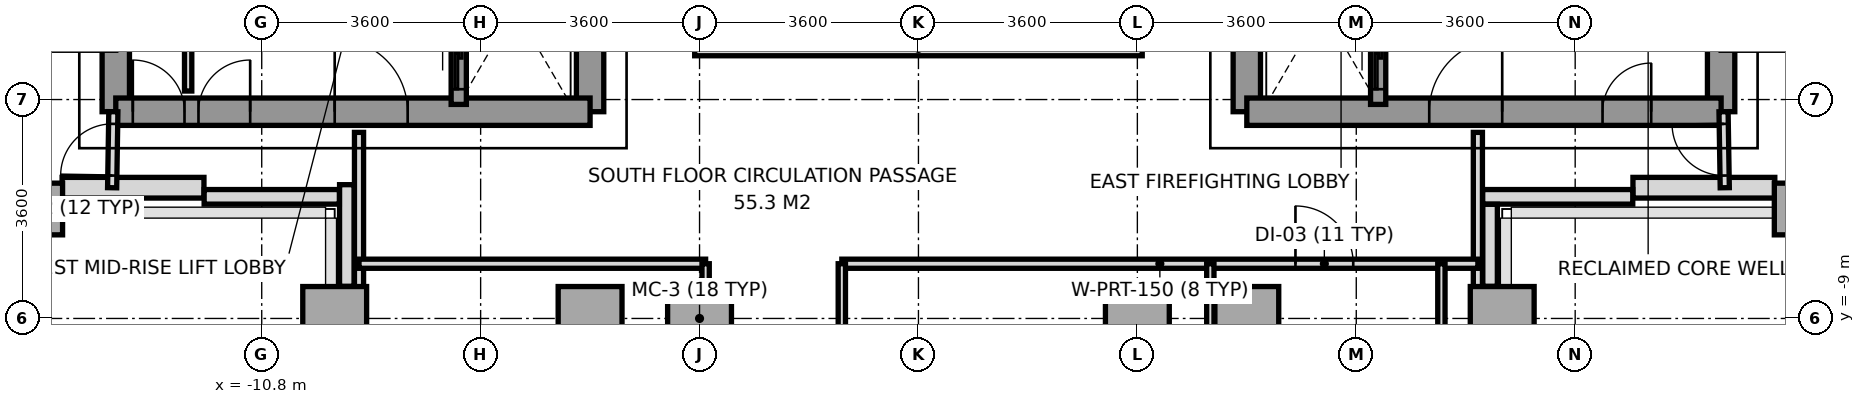
"""IFC4 building model, lengths in metres.
Left out: names, types, materials, properties, quantities, classifications, styles, units other than length and angle.
Written with IfcOpenShell. Run it as: python <this file> out.ifc"""

import sys

from ifc_helpers import new_model, si_unit, direction, frame, frame_2d, origin, origin_2d, place, context, subcontext, project, spatial, rectangle, extrude, source, transform, mapped, element, fill, save


model = new_model("IFC4")
c1 = context("Model", 3, precision=1e-05, world=origin(), true_north=direction((0.0, 1.0)))
c2 = subcontext(c1, "Body", "Model", "MODEL_VIEW")
j1 = project(units=[si_unit("LENGTHUNIT", "METRE"), si_unit("PLANEANGLEUNIT", "RADIAN")], contexts=[c1])
p1 = place(None, origin())
s1 = spatial("IfcSite", under=j1, at=p1, CompositionType="ELEMENT")
p2 = place(p1, origin())
s2 = spatial("IfcBuilding", under=s1, at=p2, CompositionType="ELEMENT")
p3 = place(p2, frame((0.0, 0.0, 127.8)))
s3 = spatial("IfcBuildingStorey", under=s2, at=p3, CompositionType="ELEMENT", Elevation=127.8)
m1 = source(origin(), c2, "Body", "SweptSolid", [
    extrude(rectangle(XDim=0.65, YDim=0.85, at=origin_2d()), origin(), (0.0, 0.0, 1.0), 3.2),
])
p4 = place(p3, frame((-14.4, -7.2, 0.0), z_axis=(0.0, 0.0, 1.0), x_axis=(1.0, 0.0, 0.0)))
e1 = element("IfcColumn", 1, at=p4, inside=s3, PredefinedType="COLUMN", context=c2, shape_type="MappedRepresentation", body=[
    mapped(m1, transform((0.0, 0.0, 0.0), x_axis=(1.0, 0.0, 0.0), y_axis=(0.0, 1.0, 0.0), z_axis=(0.0, 0.0, 1.0), scale=1.0)),
])
m2 = source(origin(), c2, "Body", "SweptSolid", [
    extrude(rectangle(XDim=1.05, YDim=1.05, at=origin_2d()), origin(), (0.0, 0.0, 1.0), 3.2),
])
for number, where, z_axis, x_axis in (
    (2, (-9.6, -9.0, 0.0), (0.0, 0.0, 1.0), (1.0, 0.0, 0.0)),
    (3, (-5.4, -9.0, 0.0), (0.0, 0.0, 1.0), (1.0, 0.0, 0.0)),
    (4, (-3.6, -9.0, 0.0), (0.0, 0.0, 1.0), (1.0, 0.0, 0.0)),
    (5, (3.6, -9.0, 0.0), (0.0, 0.0, 1.0), (1.0, 0.0, 0.0)),
    (6, (5.4, -9.0, 0.0), (0.0, 0.0, 1.0), (1.0, 0.0, 0.0)),
    (7, (9.6, -9.0, 0.0), (0.0, 0.0, 1.0), (1.0, 0.0, 0.0)),
):
    element("IfcColumn", number, at=place(p3, frame(where, z_axis=z_axis, x_axis=x_axis)), inside=s3, PredefinedType="COLUMN", context=c2, shape_type="MappedRepresentation", body=[
        mapped(m2, transform((0.0, 0.0, 0.0), x_axis=(1.0, 0.0, 0.0), y_axis=(0.0, 1.0, 0.0), z_axis=(0.0, 0.0, 1.0), scale=1.0)),
    ])
p5 = place(p3, frame((14.4, -7.2, 0.0), z_axis=(0.0, 0.0, 1.0), x_axis=(1.0, 0.0, 0.0)))
e8 = element("IfcColumn", 8, at=p5, inside=s3, PredefinedType="COLUMN", context=c2, shape_type="MappedRepresentation", body=[
    mapped(m1, transform((0.0, 0.0, 0.0), x_axis=(1.0, 0.0, 0.0), y_axis=(0.0, 1.0, 0.0), z_axis=(0.0, 0.0, 1.0), scale=1.0)),
])
for number, where, z_axis, x_axis in (
    (9, (-14.083, -6.85, 0.0), (0.0, 0.0, 1.0), (1.0, 0.0, 0.0)),
    (10, (11.75, -6.85, 0.0), (0.0, 0.0, 1.0), (1.0, 0.0, 0.0)),
):
    element("IfcWall", number, at=place(p3, frame(where, z_axis=z_axis, x_axis=x_axis)), inside=s3, PredefinedType="SOLIDWALL", context=c2, shape_type="SweptSolid", body=[
        extrude(rectangle(XDim=2.333, YDim=0.34, at=frame_2d((1.167, 0.0))), origin(), (0.0, 0.0, 1.0), 3.2),
    ])
p6 = place(p3, frame((11.747, -7.0, 0.0), z_axis=(0.0, 0.0, 1.0), x_axis=(-1.0, 0.0, 0.0)))
e11 = element("IfcWall", 11, at=p6, inside=s3, PredefinedType="PARAPET", context=c2, shape_type="SweptSolid", body=[
    extrude(rectangle(XDim=2.469, YDim=0.24, at=frame_2d((1.234, 0.0))), origin(), (0.0, 0.0, 1.0), 1.15),
])
p7 = place(p3, frame((9.4, -7.123, 0.0), z_axis=(0.0, 0.0, 1.0), x_axis=(0.0, -1.0, 0.0)))
e12 = element("IfcWall", 12, at=p7, inside=s3, PredefinedType="PARAPET", context=c2, shape_type="SweptSolid", body=[
    extrude(rectangle(XDim=1.349, YDim=0.24, at=frame_2d((0.674, 0.0))), origin(), (0.0, 0.0, 1.0), 1.15),
])
p8 = place(p3, frame((-9.4, -8.472, 0.0), z_axis=(0.0, 0.0, 1.0), x_axis=(0.0, 1.0, 0.0)))
e13 = element("IfcWall", 13, at=p8, inside=s3, PredefinedType="PARAPET", context=c2, shape_type="SweptSolid", body=[
    extrude(rectangle(XDim=1.672, YDim=0.24, at=frame_2d((0.836, 0.0))), origin(), (0.0, 0.0, 1.0), 1.15),
])
p9 = place(p3, frame((-9.523, -7.0, 0.0), z_axis=(0.0, 0.0, 1.0), x_axis=(-1.0, 0.0, 0.0)))
e14 = element("IfcWall", 14, at=p9, inside=s3, PredefinedType="PARAPET", context=c2, shape_type="SweptSolid", body=[
    extrude(rectangle(XDim=2.224, YDim=0.24, at=frame_2d((1.112, 0.0))), origin(), (0.0, 0.0, 1.0), 1.15),
])
p10 = place(p3, frame((-13.2, -5.6, 0.0), z_axis=(0.0, 0.0, 1.0), x_axis=(0.0, 1.0, 0.0)))
e15 = element("IfcWall", 15, at=p10, inside=s3, PredefinedType="SHEAR", context=c2, shape_type="SweptSolid", body=[
    extrude(rectangle(XDim=11.2, YDim=0.45, at=frame_2d((5.6, 0.0))), origin(), (0.0, 0.0, 1.0), 3.2),
])
p11 = place(p3, frame((-5.4, -5.6, 0.0), z_axis=(0.0, 0.0, 1.0), x_axis=(0.0, 1.0, 0.0)))
e16 = element("IfcWall", 16, at=p11, inside=s3, PredefinedType="SHEAR", context=c2, shape_type="SweptSolid", body=[
    extrude(rectangle(XDim=12.5, YDim=0.45, at=frame_2d((6.25, 0.0))), origin(), (0.0, 0.0, 1.0), 3.2),
])
p12 = place(p11, frame((4.55, 0.0, 0.0)))
e17 = element("IfcOpeningElement", 17, at=p12, cuts=e16, PredefinedType="OPENING", context=c2, shape_type="SweptSolid", body=[
    extrude(rectangle(XDim=1.2, YDim=2.2, at=frame_2d((0.6, 1.1))), frame((0.0, 0.235, 0.0), z_axis=(0.0, -1.0, 0.0), x_axis=(1.0, 0.0, 0.0)), (0.0, 0.0, 1.0), 0.47),
])
p13 = place(p11, frame((6.86, 0.0, 0.0)))
e18 = element("IfcOpeningElement", 18, at=p13, cuts=e16, PredefinedType="OPENING", context=c2, shape_type="SweptSolid", body=[
    extrude(rectangle(XDim=0.8, YDim=2.1, at=frame_2d((0.4, 1.05))), frame((0.0, 0.235, 0.0), z_axis=(0.0, -1.0, 0.0), x_axis=(1.0, 0.0, 0.0)), (0.0, 0.0, 1.0), 0.47),
])
p14 = place(p3, frame((-13.2, -5.6, 0.0), z_axis=(0.0, 0.0, 1.0), x_axis=(1.0, 0.0, 0.0)))
e19 = element("IfcWall", 19, at=p14, inside=s3, PredefinedType="SHEAR", context=c2, shape_type="SweptSolid", body=[
    extrude(rectangle(XDim=7.8, YDim=0.45, at=frame_2d((3.9, 0.0))), origin(), (0.0, 0.0, 1.0), 3.2),
])
p15 = place(p14, frame((3.6, 0.0, 0.0)))
e20 = element("IfcOpeningElement", 20, at=p15, cuts=e19, PredefinedType="OPENING", context=c2, shape_type="SweptSolid", body=[
    extrude(rectangle(XDim=1.2, YDim=2.2, at=frame_2d((0.6, 1.1))), frame((0.0, 0.235, 0.0), z_axis=(0.0, -1.0, 0.0), x_axis=(1.0, 0.0, 0.0)), (0.0, 0.0, 1.0), 0.47),
])
p16 = place(p14, frame((0.28, 0.0, 0.0)))
e21 = element("IfcOpeningElement", 21, at=p16, cuts=e19, PredefinedType="OPENING", context=c2, shape_type="SweptSolid", body=[
    extrude(rectangle(XDim=0.85, YDim=2.1, at=frame_2d((0.425, 1.05))), frame((0.0, 0.235, 0.0), z_axis=(0.0, -1.0, 0.0), x_axis=(1.0, 0.0, 0.0)), (0.0, 0.0, 1.0), 0.47),
])
p17 = place(p14, frame((1.36, 0.0, 0.0)))
e22 = element("IfcOpeningElement", 22, at=p17, cuts=e19, PredefinedType="OPENING", context=c2, shape_type="SweptSolid", body=[
    extrude(rectangle(XDim=0.85, YDim=2.1, at=frame_2d((0.425, 1.05))), frame((0.0, 0.235, 0.0), z_axis=(0.0, -1.0, 0.0), x_axis=(1.0, 0.0, 0.0)), (0.0, 0.0, 1.0), 0.47),
])
p18 = place(p3, frame((13.2, -5.6, 0.0), z_axis=(0.0, 0.0, 1.0), x_axis=(0.0, 1.0, 0.0)))
e23 = element("IfcWall", 23, at=p18, inside=s3, PredefinedType="SHEAR", context=c2, shape_type="SweptSolid", body=[
    extrude(rectangle(XDim=11.2, YDim=0.45, at=frame_2d((5.6, 0.0))), origin(), (0.0, 0.0, 1.0), 3.2),
])
p19 = place(p3, frame((5.4, -5.6, 0.0), z_axis=(0.0, 0.0, 1.0), x_axis=(0.0, 1.0, 0.0)))
e24 = element("IfcWall", 24, at=p19, inside=s3, PredefinedType="SHEAR", context=c2, shape_type="SweptSolid", body=[
    extrude(rectangle(XDim=12.5, YDim=0.45, at=frame_2d((6.25, 0.0))), origin(), (0.0, 0.0, 1.0), 3.2),
])
p20 = place(p19, frame((4.55, 0.0, 0.0)))
e25 = element("IfcOpeningElement", 25, at=p20, cuts=e24, PredefinedType="OPENING", context=c2, shape_type="SweptSolid", body=[
    extrude(rectangle(XDim=1.2, YDim=2.2, at=frame_2d((0.6, 1.1))), frame((0.0, 0.235, 0.0), z_axis=(0.0, -1.0, 0.0), x_axis=(1.0, 0.0, 0.0)), (0.0, 0.0, 1.0), 0.47),
])
p21 = place(p19, frame((6.86, 0.0, 0.0)))
e26 = element("IfcOpeningElement", 26, at=p21, cuts=e24, PredefinedType="OPENING", context=c2, shape_type="SweptSolid", body=[
    extrude(rectangle(XDim=0.8, YDim=2.1, at=frame_2d((0.4, 1.05))), frame((0.0, 0.235, 0.0), z_axis=(0.0, -1.0, 0.0), x_axis=(1.0, 0.0, 0.0)), (0.0, 0.0, 1.0), 0.47),
])
p22 = place(p19, frame((7.88, 0.0, 0.0)))
e27 = element("IfcOpeningElement", 27, at=p22, cuts=e24, PredefinedType="OPENING", context=c2, shape_type="SweptSolid", body=[
    extrude(rectangle(XDim=0.8, YDim=2.1, at=frame_2d((0.4, 1.05))), frame((0.0, 0.235, 0.0), z_axis=(0.0, -1.0, 0.0), x_axis=(1.0, 0.0, 0.0)), (0.0, 0.0, 1.0), 0.47),
])
p23 = place(p3, frame((5.4, -5.6, 0.0), z_axis=(0.0, 0.0, 1.0), x_axis=(1.0, 0.0, 0.0)))
e28 = element("IfcWall", 28, at=p23, inside=s3, PredefinedType="SHEAR", context=c2, shape_type="SweptSolid", body=[
    extrude(rectangle(XDim=7.8, YDim=0.45, at=frame_2d((3.9, 0.0))), origin(), (0.0, 0.0, 1.0), 3.2),
])
p24 = place(p23, frame((3.0, 0.0, 0.0)))
e29 = element("IfcOpeningElement", 29, at=p24, cuts=e28, PredefinedType="OPENING", context=c2, shape_type="SweptSolid", body=[
    extrude(rectangle(XDim=1.2, YDim=2.2, at=frame_2d((0.6, 1.1))), frame((0.0, 0.235, 0.0), z_axis=(0.0, -1.0, 0.0), x_axis=(1.0, 0.0, 0.0)), (0.0, 0.0, 1.0), 0.47),
])
p25 = place(p23, frame((5.85, 0.0, 0.0)))
e30 = element("IfcOpeningElement", 30, at=p25, cuts=e28, PredefinedType="OPENING", context=c2, shape_type="SweptSolid", body=[
    extrude(rectangle(XDim=0.8, YDim=2.1, at=frame_2d((0.4, 1.05))), frame((0.0, 0.235, 0.0), z_axis=(0.0, -1.0, 0.0), x_axis=(1.0, 0.0, 0.0)), (0.0, 0.0, 1.0), 0.47),
])
p26 = place(p3, frame((-7.56, -5.48, 0.0), z_axis=(0.0, 0.0, 1.0), x_axis=(0.0, 1.0, 0.0)))
e31 = element("IfcWall", 31, at=p26, inside=s3, PredefinedType="SOLIDWALL", context=c2, shape_type="SweptSolid", body=[
    extrude(rectangle(XDim=1.6, YDim=0.25, at=frame_2d((0.8, 0.0))), origin(), (0.0, 0.0, 1.0), 3.2),
])
p27 = place(p26, frame((0.25, 0.0, 0.0)))
e32 = element("IfcOpeningElement", 32, at=p27, cuts=e31, PredefinedType="OPENING", context=c2, shape_type="SweptSolid", body=[
    extrude(rectangle(XDim=1.1, YDim=2.2, at=frame_2d((0.55, 1.1))), frame((0.0, 0.135, 0.0), z_axis=(0.0, -1.0, 0.0), x_axis=(1.0, 0.0, 0.0)), (0.0, 0.0, 1.0), 0.27),
])
p28 = place(p3, frame((7.56, -5.48, 0.0), z_axis=(0.0, 0.0, 1.0), x_axis=(0.0, 1.0, 0.0)))
e33 = element("IfcWall", 33, at=p28, inside=s3, PredefinedType="SOLIDWALL", context=c2, shape_type="SweptSolid", body=[
    extrude(rectangle(XDim=1.6, YDim=0.25, at=frame_2d((0.8, 0.0))), origin(), (0.0, 0.0, 1.0), 3.2),
])
p29 = place(p28, frame((0.25, 0.0, 0.0)))
e34 = element("IfcOpeningElement", 34, at=p29, cuts=e33, PredefinedType="OPENING", context=c2, shape_type="SweptSolid", body=[
    extrude(rectangle(XDim=1.1, YDim=2.2, at=frame_2d((0.55, 1.1))), frame((0.0, 0.135, 0.0), z_axis=(0.0, -1.0, 0.0), x_axis=(1.0, 0.0, 0.0)), (0.0, 0.0, 1.0), 0.27),
])
p30 = place(p3, frame((-12.01, -5.26, 0.0), z_axis=(0.0, 0.0, 1.0), x_axis=(0.0, 1.0, 0.0)))
e35 = element("IfcWall", 35, at=p30, inside=s3, PredefinedType="PARTITIONING", context=c2, shape_type="SweptSolid", body=[
    extrude(rectangle(XDim=2.94, YDim=0.12, at=frame_2d((1.47, 0.0))), origin(), (0.0, 0.0, 1.0), 3.2),
])
for number, where, z_axis, x_axis in (
    (36, (-9.2, -15.68, 0.0), (0.0, 0.0, 1.0), (0.0, 1.0, 0.0)),
    (37, (9.2, -15.68, 0.0), (0.0, 0.0, 1.0), (0.0, 1.0, 0.0)),
):
    element("IfcWall", number, at=place(p3, frame(where, z_axis=z_axis, x_axis=x_axis)), inside=s3, PredefinedType="PARTITIONING", context=c2, shape_type="SweptSolid", body=[
        extrude(rectangle(XDim=9.74, YDim=0.15, at=frame_2d((4.87, 0.0))), origin(), (0.0, 0.0, 1.0), 2.7),
    ])
p31 = place(p3, frame((-9.2, -8.1, 0.0), z_axis=(0.0, 0.0, 1.0), x_axis=(1.0, 0.0, 0.0)))
e38 = element("IfcWall", 38, at=p31, inside=s3, PredefinedType="PARTITIONING", context=c2, shape_type="SweptSolid", body=[
    extrude(rectangle(XDim=5.7, YDim=0.15, at=frame_2d((2.85, 0.0))), origin(), (0.0, 0.0, 1.0), 2.75),
])
p32 = place(p3, frame((-1.26, -8.1, 0.0), z_axis=(0.0, 0.0, 1.0), x_axis=(1.0, 0.0, 0.0)))
e39 = element("IfcWall", 39, at=p32, inside=s3, PredefinedType="PARTITIONING", context=c2, shape_type="SweptSolid", body=[
    extrude(rectangle(XDim=10.46, YDim=0.15, at=frame_2d((5.23, 0.0))), origin(), (0.0, 0.0, 1.0), 2.75),
])
p33 = place(p32, frame((7.46, 0.0, 0.0)))
e40 = element("IfcOpeningElement", 40, at=p33, cuts=e39, PredefinedType="OPENING", context=c2, shape_type="SweptSolid", body=[
    extrude(rectangle(XDim=0.95, YDim=2.15, at=frame_2d((0.475, 1.075))), frame((0.0, 0.085, 0.0), z_axis=(0.0, -1.0, 0.0), x_axis=(1.0, 0.0, 0.0)), (0.0, 0.0, 1.0), 0.17),
])
p34 = place(p3, frame((-3.5, -19.3, 0.0), z_axis=(0.0, 0.0, 1.0), x_axis=(0.0, 1.0, 0.0)))
e41 = element("IfcWall", 41, at=p34, inside=s3, PredefinedType="PARTITIONING", context=c2, shape_type="SweptSolid", body=[
    extrude(rectangle(XDim=11.2, YDim=0.12, at=frame_2d((5.6, 0.0))), origin(), (0.0, 0.0, 1.0), 2.7),
])
p35 = place(p34, frame((7.9, 0.0, 0.0)))
e42 = element("IfcOpeningElement", 42, at=p35, cuts=e41, PredefinedType="OPENING", context=c2, shape_type="SweptSolid", body=[
    extrude(rectangle(XDim=0.95, YDim=2.15, at=frame_2d((0.475, 1.075))), frame((0.0, 0.07, 0.0), z_axis=(0.0, -1.0, 0.0), x_axis=(1.0, 0.0, 0.0)), (0.0, 0.0, 1.0), 0.14),
])
p36 = place(p34, frame((4.5, 0.0, 0.0)))
e43 = element("IfcOpeningElement", 43, at=p36, cuts=e41, PredefinedType="OPENING", context=c2, shape_type="SweptSolid", body=[
    extrude(rectangle(XDim=0.95, YDim=2.15, at=frame_2d((0.475, 1.075))), frame((0.0, 0.07, 0.0), z_axis=(0.0, -1.0, 0.0), x_axis=(1.0, 0.0, 0.0)), (0.0, 0.0, 1.0), 0.14),
])
p37 = place(p34, frame((1.0, 0.0, 0.0)))
e44 = element("IfcOpeningElement", 44, at=p37, cuts=e41, PredefinedType="OPENING", context=c2, shape_type="SweptSolid", body=[
    extrude(rectangle(XDim=0.95, YDim=2.15, at=frame_2d((0.475, 1.075))), frame((0.0, 0.07, 0.0), z_axis=(0.0, -1.0, 0.0), x_axis=(1.0, 0.0, 0.0)), (0.0, 0.0, 1.0), 0.14),
])
p38 = place(p3, frame((-1.26, -19.3, 0.0), z_axis=(0.0, 0.0, 1.0), x_axis=(0.0, 1.0, 0.0)))
e45 = element("IfcWall", 45, at=p38, inside=s3, PredefinedType="PARTITIONING", context=c2, shape_type="SweptSolid", body=[
    extrude(rectangle(XDim=11.2, YDim=0.12, at=frame_2d((5.6, 0.0))), origin(), (0.0, 0.0, 1.0), 2.7),
])
p39 = place(p38, frame((1.8, 0.0, 0.0)))
e46 = element("IfcOpeningElement", 46, at=p39, cuts=e45, PredefinedType="OPENING", context=c2, shape_type="SweptSolid", body=[
    extrude(rectangle(XDim=1.1, YDim=2.2, at=frame_2d((0.55, 1.1))), frame((0.0, 0.07, 0.0), z_axis=(0.0, -1.0, 0.0), x_axis=(1.0, 0.0, 0.0)), (0.0, 0.0, 1.0), 0.14),
])
p40 = place(p3, frame((4.8, -11.5, 0.0), z_axis=(0.0, 0.0, 1.0), x_axis=(0.0, 1.0, 0.0)))
e47 = element("IfcWall", 47, at=p40, inside=s3, PredefinedType="PARTITIONING", context=c2, shape_type="SweptSolid", body=[
    extrude(rectangle(XDim=3.4, YDim=0.12, at=frame_2d((1.7, 0.0))), origin(), (0.0, 0.0, 1.0), 3.2),
])
p41 = place(p3, frame((8.6, -11.5, 0.0), z_axis=(0.0, 0.0, 1.0), x_axis=(0.0, 1.0, 0.0)))
e48 = element("IfcWall", 48, at=p41, inside=s3, PredefinedType="PARTITIONING", context=c2, shape_type="SweptSolid", body=[
    extrude(rectangle(XDim=3.4, YDim=0.12, at=frame_2d((1.7, 0.0))), origin(), (0.0, 0.0, 1.0), 2.7),
])
p42 = place(p3, frame((-13.26, -6.85, 0.0), z_axis=(0.0, 0.0, 1.0), x_axis=(0.016013571389, 0.999871774545, 0.0)))
e49 = element("IfcWall", 49, at=p42, inside=s3, PredefinedType="PARTITIONING", context=c2, shape_type="SweptSolid", body=[
    extrude(rectangle(XDim=1.25, YDim=0.15, at=frame_2d((0.625, 0.0))), origin(), (0.0, 0.0, 1.0), 3.2),
])
p43 = place(p42, frame((0.2, 0.0, 0.0)))
e50 = element("IfcOpeningElement", 50, at=p43, cuts=e49, PredefinedType="OPENING", context=c2, shape_type="SweptSolid", body=[
    extrude(rectangle(XDim=0.85, YDim=2.1, at=frame_2d((0.425, 1.05))), frame((0.0, 0.085, 0.0), z_axis=(0.0, -1.0, 0.0), x_axis=(1.0, 0.0, 0.0)), (0.0, 0.0, 1.0), 0.17),
])
p44 = place(p3, frame((13.26, -6.85, 0.0), z_axis=(0.0, 0.0, 1.0), x_axis=(-0.016013571389, 0.999871774545, 0.0)))
e51 = element("IfcWall", 51, at=p44, inside=s3, PredefinedType="PARTITIONING", context=c2, shape_type="SweptSolid", body=[
    extrude(rectangle(XDim=1.25, YDim=0.15, at=frame_2d((0.625, 0.0))), origin(), (0.0, 0.0, 1.0), 3.2),
])
p45 = place(p44, frame((0.2, 0.0, 0.0)))
e52 = element("IfcOpeningElement", 52, at=p45, cuts=e51, PredefinedType="OPENING", context=c2, shape_type="SweptSolid", body=[
    extrude(rectangle(XDim=0.85, YDim=2.1, at=frame_2d((0.425, 1.05))), frame((0.0, 0.085, 0.0), z_axis=(0.0, -1.0, 0.0), x_axis=(1.0, 0.0, 0.0)), (0.0, 0.0, 1.0), 0.17),
])
p46 = place(p3, frame((-3.68, -4.56, 0.0), z_axis=(0.0, 0.0, 1.0), x_axis=(1.0, 0.0, 0.0)))
e53 = element("IfcWall", 53, at=p46, inside=s3, PredefinedType="PARAPET", context=c2, shape_type="SweptSolid", body=[
    extrude(rectangle(XDim=7.36, YDim=0.24, at=frame_2d((3.68, 0.0))), origin(), (0.0, 0.0, 1.0), 1.15),
])
m3 = source(origin(), c2, "Body", "SweptSolid", [
    extrude(rectangle(XDim=1.2, YDim=2.2, at=frame_2d((0.6, 1.1))), frame((0.0, 0.025, 0.0), z_axis=(0.0, -1.0, 0.0), x_axis=(1.0, 0.0, 0.0)), (0.0, 0.0, 1.0), 0.05),
])
p47 = place(p15, origin())
e54 = element("IfcDoor", 54, at=p47, inside=s3, OperationType="SINGLE_SWING_LEFT", PredefinedType="DOOR", context=c2, shape_type="MappedRepresentation", body=[
    mapped(m3, transform((0.0, 0.0, 0.0), x_axis=(1.0, 0.0, 0.0), y_axis=(0.0, 1.0, 0.0), z_axis=(0.0, 0.0, 1.0), scale=1.0)),
])
fill(e20, e54)
p48 = place(p24, origin())
e55 = element("IfcDoor", 55, at=p48, inside=s3, OperationType="SINGLE_SWING_RIGHT", PredefinedType="DOOR", context=c2, shape_type="MappedRepresentation", body=[
    mapped(m3, transform((0.0, 0.0, 0.0), x_axis=(1.0, 0.0, 0.0), y_axis=(0.0, 1.0, 0.0), z_axis=(0.0, 0.0, 1.0), scale=1.0)),
])
fill(e29, e55)
m4 = source(origin(), c2, "Body", "SweptSolid", [
    extrude(rectangle(XDim=0.85, YDim=2.1, at=frame_2d((0.425, 1.05))), frame((0.0, 0.025, 0.0), z_axis=(0.0, -1.0, 0.0), x_axis=(1.0, 0.0, 0.0)), (0.0, 0.0, 1.0), 0.05),
])
p49 = place(p16, origin())
e56 = element("IfcDoor", 56, at=p49, inside=s3, OperationType="SINGLE_SWING_LEFT", PredefinedType="DOOR", context=c2, shape_type="MappedRepresentation", body=[
    mapped(m4, transform((0.0, 0.0, 0.0), x_axis=(1.0, 0.0, 0.0), y_axis=(0.0, 1.0, 0.0), z_axis=(0.0, 0.0, 1.0), scale=1.0)),
])
fill(e21, e56)
p50 = place(p17, origin())
e57 = element("IfcDoor", 57, at=p50, inside=s3, OperationType="SINGLE_SWING_RIGHT", PredefinedType="DOOR", context=c2, shape_type="MappedRepresentation", body=[
    mapped(m4, transform((0.0, 0.0, 0.0), x_axis=(1.0, 0.0, 0.0), y_axis=(0.0, 1.0, 0.0), z_axis=(0.0, 0.0, 1.0), scale=1.0)),
])
fill(e22, e57)
m5 = source(origin(), c2, "Body", "SweptSolid", [
    extrude(rectangle(XDim=0.8, YDim=2.1, at=frame_2d((0.4, 1.05))), frame((0.0, 0.025, 0.0), z_axis=(0.0, -1.0, 0.0), x_axis=(1.0, 0.0, 0.0)), (0.0, 0.0, 1.0), 0.05),
])
p51 = place(p25, origin())
e58 = element("IfcDoor", 58, at=p51, inside=s3, OperationType="SINGLE_SWING_RIGHT", PredefinedType="DOOR", context=c2, shape_type="MappedRepresentation", body=[
    mapped(m5, transform((0.0, 0.0, 0.0), x_axis=(1.0, 0.0, 0.0), y_axis=(0.0, 1.0, 0.0), z_axis=(0.0, 0.0, 1.0), scale=1.0)),
])
fill(e30, e58)
m6 = source(origin(), c2, "Body", "SweptSolid", [
    extrude(rectangle(XDim=1.1, YDim=2.2, at=frame_2d((0.55, 1.1))), frame((0.0, 0.025, 0.0), z_axis=(0.0, -1.0, 0.0), x_axis=(1.0, 0.0, 0.0)), (0.0, 0.0, 1.0), 0.05),
])
p52 = place(p27, origin())
e59 = element("IfcDoor", 59, at=p52, inside=s3, OperationType="SLIDING_TO_LEFT", PredefinedType="DOOR", context=c2, shape_type="MappedRepresentation", body=[
    mapped(m6, transform((0.0, 0.0, 0.0), x_axis=(1.0, 0.0, 0.0), y_axis=(0.0, 1.0, 0.0), z_axis=(0.0, 0.0, 1.0), scale=1.0)),
])
fill(e32, e59)
p53 = place(p29, origin())
e60 = element("IfcDoor", 60, at=p53, inside=s3, OperationType="SLIDING_TO_LEFT", PredefinedType="DOOR", context=c2, shape_type="MappedRepresentation", body=[
    mapped(m6, transform((0.0, 0.0, 0.0), x_axis=(1.0, 0.0, 0.0), y_axis=(0.0, 1.0, 0.0), z_axis=(0.0, 0.0, 1.0), scale=1.0)),
])
fill(e34, e60)
m7 = source(origin(), c2, "Body", "SweptSolid", [
    extrude(rectangle(XDim=0.95, YDim=2.15, at=frame_2d((0.475, 1.075))), frame((0.0, 0.025, 0.0), z_axis=(0.0, -1.0, 0.0), x_axis=(1.0, 0.0, 0.0)), (0.0, 0.0, 1.0), 0.05),
])
p54 = place(p33, origin())
e61 = element("IfcDoor", 61, at=p54, inside=s3, OperationType="SINGLE_SWING_LEFT", PredefinedType="DOOR", context=c2, shape_type="MappedRepresentation", body=[
    mapped(m7, transform((0.0, 0.0, 0.0), x_axis=(1.0, 0.0, 0.0), y_axis=(0.0, 1.0, 0.0), z_axis=(0.0, 0.0, 1.0), scale=1.0)),
])
fill(e40, e61)
p55 = place(p43, origin())
e62 = element("IfcDoor", 62, at=p55, inside=s3, OperationType="SINGLE_SWING_LEFT", PredefinedType="DOOR", context=c2, shape_type="MappedRepresentation", body=[
    mapped(m4, transform((0.0, 0.0, 0.0), x_axis=(1.0, 0.0, 0.0), y_axis=(0.0, 1.0, 0.0), z_axis=(0.0, 0.0, 1.0), scale=1.0)),
])
fill(e50, e62)
p56 = place(p45, origin())
e63 = element("IfcDoor", 63, at=p56, inside=s3, OperationType="SINGLE_SWING_RIGHT", PredefinedType="DOOR", context=c2, shape_type="MappedRepresentation", body=[
    mapped(m4, transform((0.0, 0.0, 0.0), x_axis=(1.0, 0.0, 0.0), y_axis=(0.0, 1.0, 0.0), z_axis=(0.0, 0.0, 1.0), scale=1.0)),
])
fill(e52, e63)
save(model, sys.argv[1])
